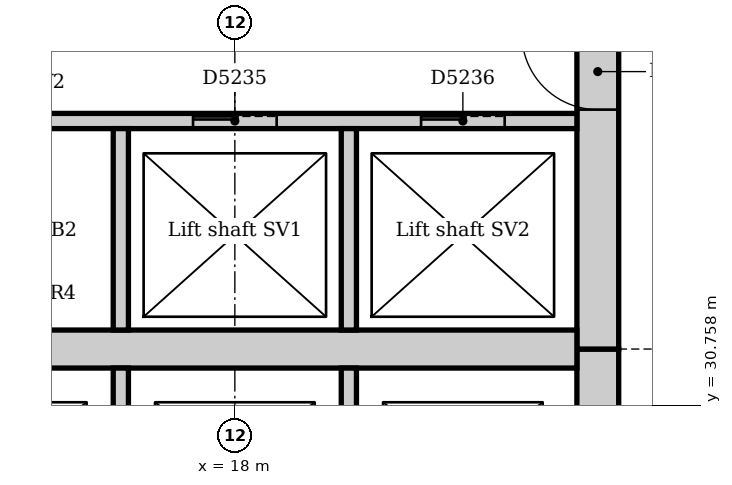
"""IFC4 building model, lengths in metres.
Left out: names, types, materials, properties, quantities, classifications, styles, units other than length and angle.
Written with IfcOpenShell. Run it as: python <this file> out.ifc"""

import sys

from ifc_helpers import new_model, si_unit, direction, frame, frame_2d, origin, place, context, subcontext, project, spatial, rectangle, extrude, element, fill, save


model = new_model("IFC4")
c1 = context("Model", 3, precision=1e-05, world=origin(), true_north=direction((0.0, 1.0)))
c2 = subcontext(c1, "Body", "Model", "MODEL_VIEW")
j1 = project(units=[si_unit("LENGTHUNIT", "METRE"), si_unit("PLANEANGLEUNIT", "RADIAN")], contexts=[c1])
p1 = place(None, origin())
s1 = spatial("IfcSite", under=j1, at=p1, CompositionType="ELEMENT")
p2 = place(p1, origin())
s2 = spatial("IfcBuilding", under=s1, at=p2, CompositionType="ELEMENT")
p3 = place(p2, frame((0.0, 0.0, 230.0)))
s3 = spatial("IfcBuildingStorey", under=s2, at=p3, CompositionType="ELEMENT", Elevation=230.0)
p4 = place(p3, frame((22.775, 21.0, 0.0), z_axis=(0.0, 0.0, 1.0), x_axis=(0.0, 1.0, 0.0)))
e1 = element("IfcWall", 1, at=p4, inside=s3, PredefinedType="SOLIDWALL", context=c2, shape_type="SweptSolid", body=[
    extrude(rectangle(XDim=10.5, YDim=0.55, at=frame_2d((5.25, 0.0))), origin(), (0.0, 0.0, 1.0), 4.0),
])
p5 = place(p4, frame((4.35, 0.0, 0.0)))
e2 = element("IfcOpeningElement", 2, at=p5, cuts=e1, PredefinedType="OPENING", context=c2, shape_type="SweptSolid", body=[
    extrude(rectangle(XDim=1.8, YDim=2.1, at=frame_2d((0.9, 1.05))), frame((0.0, 0.285, 0.0), z_axis=(0.0, -1.0, 0.0), x_axis=(1.0, 0.0, 0.0)), (0.0, 0.0, 1.0), 0.57),
])
p6 = place(p3, frame((22.775, 31.5, 0.0), z_axis=(0.0, 0.0, 1.0), x_axis=(0.0, 1.0, 0.0)))
e3 = element("IfcWall", 3, at=p6, inside=s3, PredefinedType="SOLIDWALL", context=c2, shape_type="SweptSolid", body=[
    extrude(rectangle(XDim=10.5, YDim=0.55, at=frame_2d((5.25, 0.0))), origin(), (0.0, 0.0, 1.0), 4.0),
])
p7 = place(p6, frame((3.15, 0.0, 0.0)))
e4 = element("IfcOpeningElement", 4, at=p7, cuts=e3, PredefinedType="OPENING", context=c2, shape_type="SweptSolid", body=[
    extrude(rectangle(XDim=1.0, YDim=2.1, at=frame_2d((0.5, 1.05))), frame((0.0, 0.285, 0.0), z_axis=(0.0, -1.0, 0.0), x_axis=(1.0, 0.0, 0.0)), (0.0, 0.0, 1.0), 0.57),
])
p8 = place(p6, frame((5.2, 0.0, 0.0)))
e5 = element("IfcOpeningElement", 5, at=p8, cuts=e3, PredefinedType="OPENING", context=c2, shape_type="SweptSolid", body=[
    extrude(rectangle(XDim=1.0, YDim=2.1, at=frame_2d((0.5, 1.05))), frame((0.0, 0.285, 0.0), z_axis=(0.0, -1.0, 0.0), x_axis=(1.0, 0.0, 0.0)), (0.0, 0.0, 1.0), 0.57),
])
p9 = place(p3, frame((4.5, 31.5, 0.0), z_axis=(0.0, 0.0, 1.0), x_axis=(1.0, 0.0, 0.0)))
e6 = element("IfcWall", 6, at=p9, inside=s3, PredefinedType="SOLIDWALL", context=c2, shape_type="SweptSolid", body=[
    extrude(rectangle(XDim=18.0, YDim=0.5, at=frame_2d((9.0, 0.0))), origin(), (0.0, 0.0, 1.0), 4.0),
])
p10 = place(p3, frame((10.4, 34.5, 0.0), z_axis=(0.0, 0.0, 1.0), x_axis=(1.0, 0.0, 0.0)))
e7 = element("IfcWall", 7, at=p10, inside=s3, PredefinedType="PARTITIONING", context=c2, shape_type="SweptSolid", body=[
    extrude(rectangle(XDim=12.1, YDim=0.2, at=frame_2d((6.05, 0.0))), origin(), (0.0, 0.0, 1.0), 3.85),
])
p11 = place(p10, frame((7.05, 0.0, 0.0)))
e8 = element("IfcOpeningElement", 8, at=p11, cuts=e7, PredefinedType="OPENING", context=c2, shape_type="SweptSolid", body=[
    extrude(rectangle(XDim=1.1, YDim=2.1, at=frame_2d((0.55, 1.05))), frame((0.0, 0.11, 0.0), z_axis=(0.0, -1.0, 0.0), x_axis=(1.0, 0.0, 0.0)), (0.0, 0.0, 1.0), 0.22),
])
p12 = place(p10, frame((10.05, 0.0, 0.0)))
e9 = element("IfcOpeningElement", 9, at=p12, cuts=e7, PredefinedType="OPENING", context=c2, shape_type="SweptSolid", body=[
    extrude(rectangle(XDim=1.1, YDim=2.1, at=frame_2d((0.55, 1.05))), frame((0.0, 0.11, 0.0), z_axis=(0.0, -1.0, 0.0), x_axis=(1.0, 0.0, 0.0)), (0.0, 0.0, 1.0), 0.22),
])
for number, where, z_axis, x_axis in (
    (10, (16.5, 28.6, 0.0), (0.0, 0.0, 1.0), (0.0, 1.0, 0.0)),
    (11, (16.5, 31.75, 0.0), (0.0, 0.0, 1.0), (0.0, 1.0, 0.0)),
    (12, (19.5, 28.6, 0.0), (0.0, 0.0, 1.0), (0.0, 1.0, 0.0)),
    (13, (19.5, 31.75, 0.0), (0.0, 0.0, 1.0), (0.0, 1.0, 0.0)),
):
    element("IfcWall", number, at=place(p3, frame(where, z_axis=z_axis, x_axis=x_axis)), inside=s3, PredefinedType="PARTITIONING", context=c2, shape_type="SweptSolid", body=[
        extrude(rectangle(XDim=2.65, YDim=0.2, at=frame_2d((1.325, 0.0))), origin(), (0.0, 0.0, 1.0), 3.85),
    ])
p13 = place(p11, origin())
e14 = element("IfcDoor", 14, at=p13, inside=s3, OperationType="SLIDING_TO_LEFT", PredefinedType="DOOR", context=c2, shape_type="SweptSolid", body=[
    extrude(rectangle(XDim=1.1, YDim=2.1, at=frame_2d((0.55, 1.05))), frame((0.0, 0.025, 0.0), z_axis=(0.0, -1.0, 0.0), x_axis=(1.0, 0.0, 0.0)), (0.0, 0.0, 1.0), 0.05),
])
fill(e8, e14)
p14 = place(p12, origin())
e15 = element("IfcDoor", 15, at=p14, inside=s3, OperationType="SLIDING_TO_LEFT", PredefinedType="DOOR", context=c2, shape_type="SweptSolid", body=[
    extrude(rectangle(XDim=1.1, YDim=2.1, at=frame_2d((0.55, 1.05))), frame((0.0, 0.025, 0.0), z_axis=(0.0, -1.0, 0.0), x_axis=(1.0, 0.0, 0.0)), (0.0, 0.0, 1.0), 0.05),
])
fill(e9, e15)
p15 = place(p7, origin())
e16 = element("IfcDoor", 16, at=p15, inside=s3, OperationType="SINGLE_SWING_RIGHT", PredefinedType="DOOR", context=c2, shape_type="SweptSolid", body=[
    extrude(rectangle(XDim=1.0, YDim=2.1, at=frame_2d((0.5, 1.05))), frame((0.0, 0.025, 0.0), z_axis=(0.0, -1.0, 0.0), x_axis=(1.0, 0.0, 0.0)), (0.0, 0.0, 1.0), 0.05),
])
fill(e4, e16)
save(model, sys.argv[1])
